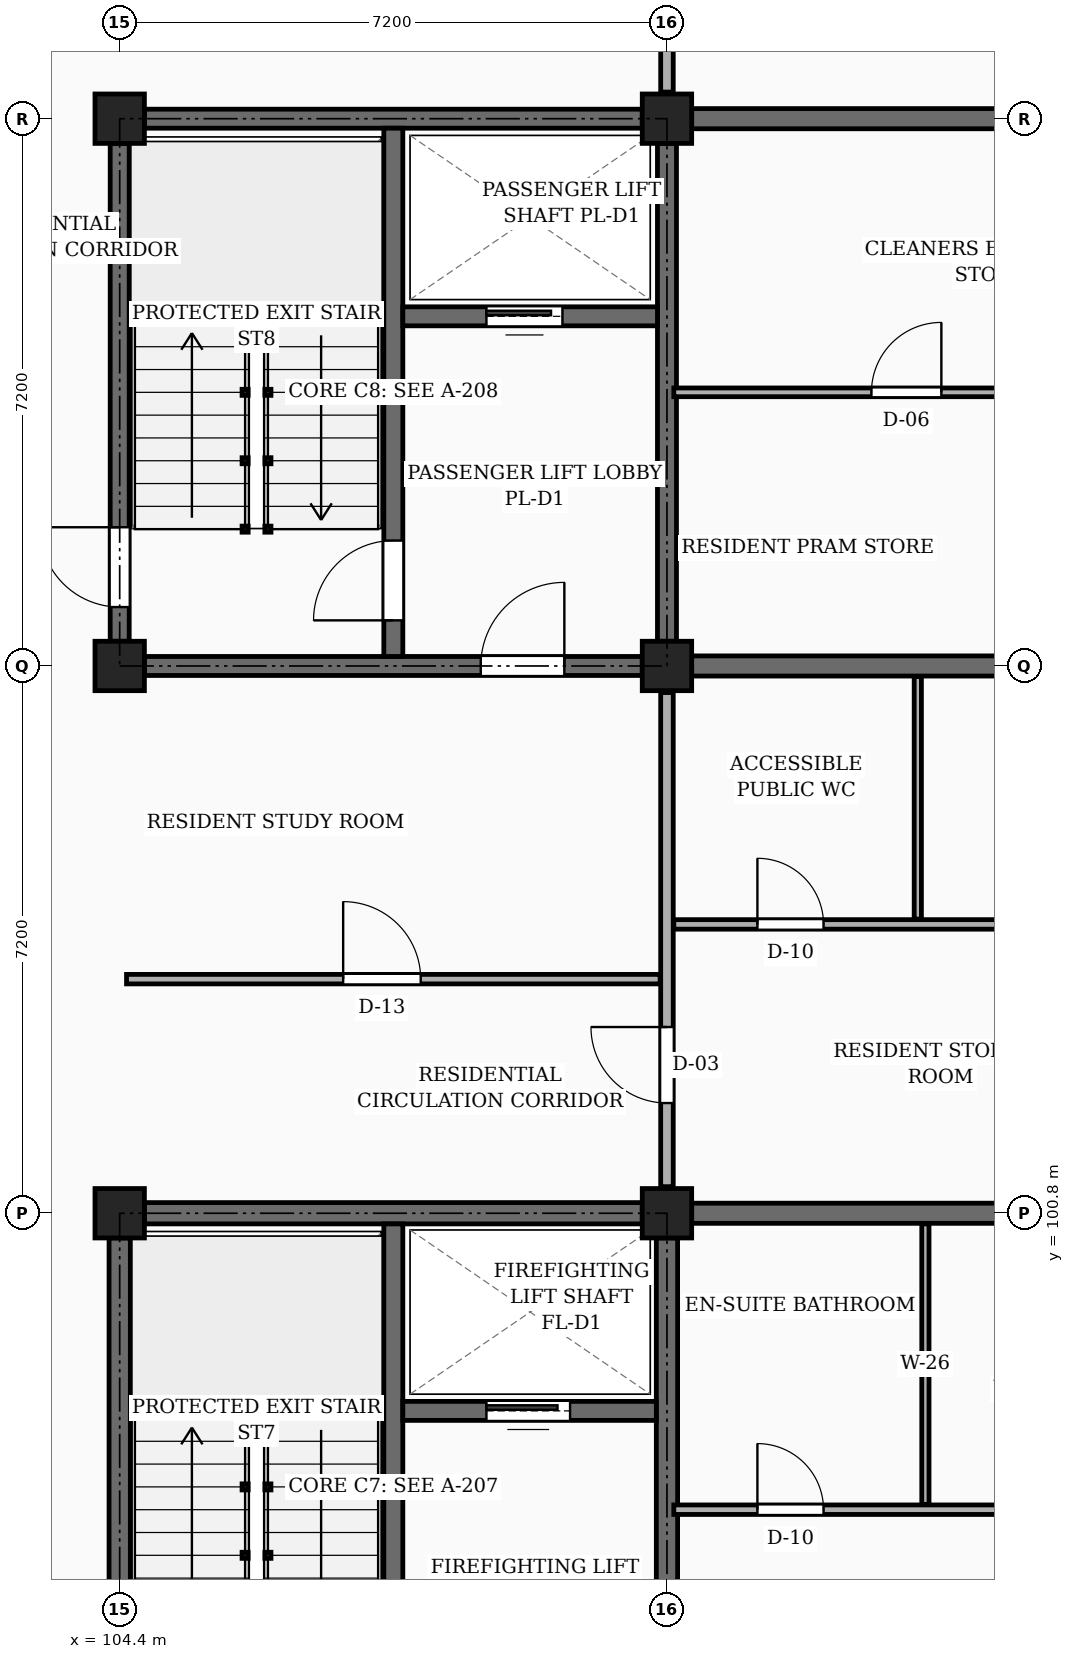
"""IFC4 building model, lengths in metres.
Left out: names, types, materials, properties, quantities, classifications, styles, units other than length and angle.
Written with IfcOpenShell. Run it as: python <this file> out.ifc"""

import sys

from ifc_helpers import new_model, si_unit, direction, frame, frame_2d, origin, origin_2d, place, context, subcontext, project, spatial, rectangle, extrude, element, fill, save


model = new_model("IFC4")
c1 = context("Model", 3, precision=1e-05, world=origin(), true_north=direction((0.0, 1.0)))
c2 = subcontext(c1, "Body", "Model", "MODEL_VIEW")
j1 = project(units=[si_unit("LENGTHUNIT", "METRE"), si_unit("PLANEANGLEUNIT", "RADIAN")], contexts=[c1])
p1 = place(None, origin())
s1 = spatial("IfcSite", under=j1, at=p1, CompositionType="ELEMENT")
p2 = place(p1, origin())
s2 = spatial("IfcBuilding", under=s1, at=p2, CompositionType="ELEMENT")
p3 = place(p2, frame((0.0, 0.0, 7.65)))
s3 = spatial("IfcBuildingStorey", under=s2, at=p3, CompositionType="ELEMENT", Elevation=7.65)
for number, where, z_axis, x_axis in (
    (1, (104.4, 100.8, 0.0), (0.0, 0.0, 1.0), (1.0, 0.0, 0.0)),
    (2, (104.4, 108.0, 0.0), (0.0, 0.0, 1.0), (1.0, 0.0, 0.0)),
    (3, (104.4, 115.2, 0.0), (0.0, 0.0, 1.0), (1.0, 0.0, 0.0)),
    (4, (111.6, 100.8, 0.0), (0.0, 0.0, 1.0), (1.0, 0.0, 0.0)),
    (5, (111.6, 108.0, 0.0), (0.0, 0.0, 1.0), (1.0, 0.0, 0.0)),
    (6, (111.6, 115.2, 0.0), (0.0, 0.0, 1.0), (1.0, 0.0, 0.0)),
):
    element("IfcColumn", number, at=place(p3, frame(where, z_axis=z_axis, x_axis=x_axis)), inside=s3, PredefinedType="COLUMN", context=c2, shape_type="SweptSolid", body=[
        extrude(rectangle(XDim=0.65, YDim=0.65, at=origin_2d()), origin(), (0.0, 0.0, 1.0), 3.15),
    ])
p4 = place(p3, frame((111.925, 100.8, 0.0), z_axis=(0.0, 0.0, 1.0), x_axis=(1.0, 0.0, 0.0)))
e7 = element("IfcWall", 7, at=p4, inside=s3, PredefinedType="SOLIDWALL", context=c2, shape_type="SweptSolid", body=[
    extrude(rectangle(XDim=6.575, YDim=0.265, at=frame_2d((3.288, 0.0))), origin(), (0.0, 0.0, 1.0), 2.19),
])
p5 = place(p3, frame((111.925, 108.0, 0.0), z_axis=(0.0, 0.0, 1.0), x_axis=(1.0, 0.0, 0.0)))
e8 = element("IfcWall", 8, at=p5, inside=s3, PredefinedType="SOLIDWALL", context=c2, shape_type="SweptSolid", body=[
    extrude(rectangle(XDim=6.575, YDim=0.265, at=frame_2d((3.288, 0.0))), origin(), (0.0, 0.0, 1.0), 2.19),
])
p6 = place(p5, frame((4.35, 0.0, 0.0)))
e9 = element("IfcOpeningElement", 9, at=p6, cuts=e8, PredefinedType="OPENING", context=c2, shape_type="SweptSolid", body=[
    extrude(rectangle(XDim=0.98, YDim=2.12, at=frame_2d((0.49, 1.06))), frame((0.0, 0.143, 0.0), z_axis=(0.0, -1.0, 0.0), x_axis=(1.0, 0.0, 0.0)), (0.0, 0.0, 1.0), 0.285),
])
p7 = place(p3, frame((111.925, 115.2, 0.0), z_axis=(0.0, 0.0, 1.0), x_axis=(1.0, 0.0, 0.0)))
e10 = element("IfcWall", 10, at=p7, inside=s3, PredefinedType="SOLIDWALL", context=c2, shape_type="SweptSolid", body=[
    extrude(rectangle(XDim=6.575, YDim=0.265, at=frame_2d((3.288, 0.0))), origin(), (0.0, 0.0, 1.0), 2.19),
])
p8 = place(p3, frame((104.4, 93.925, 0.0), z_axis=(0.0, 0.0, 1.0), x_axis=(0.0, 1.0, 0.0)))
e11 = element("IfcWall", 11, at=p8, inside=s3, PredefinedType="SHEAR", context=c2, shape_type="SweptSolid", body=[
    extrude(rectangle(XDim=6.55, YDim=0.28, at=frame_2d((3.275, 0.0))), origin(), (0.0, 0.0, 1.0), 2.89),
])
p9 = place(p8, frame((0.45, 0.0, 0.0)))
e12 = element("IfcOpeningElement", 12, at=p9, cuts=e11, PredefinedType="OPENING", context=c2, shape_type="SweptSolid", body=[
    extrude(rectangle(XDim=1.05, YDim=2.15, at=frame_2d((0.525, 1.075))), frame((0.0, 0.15, 0.0), z_axis=(0.0, -1.0, 0.0), x_axis=(1.0, 0.0, 0.0)), (0.0, 0.0, 1.0), 0.3),
])
p10 = place(p3, frame((104.725, 100.8, 0.0), z_axis=(0.0, 0.0, 1.0), x_axis=(1.0, 0.0, 0.0)))
e13 = element("IfcWall", 13, at=p10, inside=s3, PredefinedType="SHEAR", context=c2, shape_type="SweptSolid", body=[
    extrude(rectangle(XDim=6.55, YDim=0.28, at=frame_2d((3.275, 0.0))), origin(), (0.0, 0.0, 1.0), 2.89),
])
p11 = place(p3, frame((111.6, 93.925, 0.0), z_axis=(0.0, 0.0, 1.0), x_axis=(0.0, 1.0, 0.0)))
e14 = element("IfcWall", 14, at=p11, inside=s3, PredefinedType="SHEAR", context=c2, shape_type="SweptSolid", body=[
    extrude(rectangle(XDim=6.55, YDim=0.28, at=frame_2d((3.275, 0.0))), origin(), (0.0, 0.0, 1.0), 2.89),
])
p12 = place(p3, frame((108.0, 93.74, 0.0), z_axis=(0.0, 0.0, 1.0), x_axis=(0.0, 1.0, 0.0)))
e15 = element("IfcWall", 15, at=p12, inside=s3, PredefinedType="SHEAR", context=c2, shape_type="SweptSolid", body=[
    extrude(rectangle(XDim=6.92, YDim=0.25, at=frame_2d((3.46, 0.0))), origin(), (0.0, 0.0, 1.0), 2.89),
])
p13 = place(p12, frame((0.46, 0.0, 0.0)))
e16 = element("IfcOpeningElement", 16, at=p13, cuts=e15, PredefinedType="OPENING", context=c2, shape_type="SweptSolid", body=[
    extrude(rectangle(XDim=1.05, YDim=2.15, at=frame_2d((0.525, 1.075))), frame((0.0, 0.135, 0.0), z_axis=(0.0, -1.0, 0.0), x_axis=(1.0, 0.0, 0.0)), (0.0, 0.0, 1.0), 0.27),
])
p14 = place(p3, frame((108.125, 98.2, 0.0), z_axis=(0.0, 0.0, 1.0), x_axis=(1.0, 0.0, 0.0)))
e17 = element("IfcWall", 17, at=p14, inside=s3, PredefinedType="SHEAR", context=c2, shape_type="SweptSolid", body=[
    extrude(rectangle(XDim=3.335, YDim=0.25, at=frame_2d((1.667, 0.0))), origin(), (0.0, 0.0, 1.0), 2.89),
])
p15 = place(p14, frame((1.1, 0.0, 0.0)))
e18 = element("IfcOpeningElement", 18, at=p15, cuts=e17, PredefinedType="OPENING", context=c2, shape_type="SweptSolid", body=[
    extrude(rectangle(XDim=1.1, YDim=2.2, at=frame_2d((0.55, 1.1))), frame((0.0, 0.135, 0.0), z_axis=(0.0, -1.0, 0.0), x_axis=(1.0, 0.0, 0.0)), (0.0, 0.0, 1.0), 0.27),
])
p16 = place(p3, frame((104.4, 108.325, 0.0), z_axis=(0.0, 0.0, 1.0), x_axis=(0.0, 1.0, 0.0)))
e19 = element("IfcWall", 19, at=p16, inside=s3, PredefinedType="SHEAR", context=c2, shape_type="SweptSolid", body=[
    extrude(rectangle(XDim=6.55, YDim=0.25, at=frame_2d((3.275, 0.0))), origin(), (0.0, 0.0, 1.0), 2.89),
])
p17 = place(p16, frame((0.45, 0.0, 0.0)))
e20 = element("IfcOpeningElement", 20, at=p17, cuts=e19, PredefinedType="OPENING", context=c2, shape_type="SweptSolid", body=[
    extrude(rectangle(XDim=1.05, YDim=2.15, at=frame_2d((0.525, 1.075))), frame((0.0, 0.135, 0.0), z_axis=(0.0, -1.0, 0.0), x_axis=(1.0, 0.0, 0.0)), (0.0, 0.0, 1.0), 0.27),
])
p18 = place(p3, frame((104.725, 115.2, 0.0), z_axis=(0.0, 0.0, 1.0), x_axis=(1.0, 0.0, 0.0)))
e21 = element("IfcWall", 21, at=p18, inside=s3, PredefinedType="SHEAR", context=c2, shape_type="SweptSolid", body=[
    extrude(rectangle(XDim=6.55, YDim=0.25, at=frame_2d((3.275, 0.0))), origin(), (0.0, 0.0, 1.0), 2.89),
])
p19 = place(p3, frame((111.6, 108.325, 0.0), z_axis=(0.0, 0.0, 1.0), x_axis=(0.0, 1.0, 0.0)))
e22 = element("IfcWall", 22, at=p19, inside=s3, PredefinedType="SHEAR", context=c2, shape_type="SweptSolid", body=[
    extrude(rectangle(XDim=6.55, YDim=0.25, at=frame_2d((3.275, 0.0))), origin(), (0.0, 0.0, 1.0), 2.89),
])
p20 = place(p3, frame((104.725, 108.0, 0.0), z_axis=(0.0, 0.0, 1.0), x_axis=(1.0, 0.0, 0.0)))
e23 = element("IfcWall", 23, at=p20, inside=s3, PredefinedType="SHEAR", context=c2, shape_type="SweptSolid", body=[
    extrude(rectangle(XDim=6.55, YDim=0.25, at=frame_2d((3.275, 0.0))), origin(), (0.0, 0.0, 1.0), 2.89),
])
p21 = place(p20, frame((4.425, 0.0, 0.0)))
e24 = element("IfcOpeningElement", 24, at=p21, cuts=e23, PredefinedType="OPENING", context=c2, shape_type="SweptSolid", body=[
    extrude(rectangle(XDim=1.1, YDim=2.15, at=frame_2d((0.55, 1.075))), frame((0.0, 0.135, 0.0), z_axis=(0.0, -1.0, 0.0), x_axis=(1.0, 0.0, 0.0)), (0.0, 0.0, 1.0), 0.27),
])
p22 = place(p3, frame((108.0, 108.125, 0.0), z_axis=(0.0, 0.0, 1.0), x_axis=(0.0, 1.0, 0.0)))
e25 = element("IfcWall", 25, at=p22, inside=s3, PredefinedType="SHEAR", context=c2, shape_type="SweptSolid", body=[
    extrude(rectangle(XDim=6.95, YDim=0.25, at=frame_2d((3.475, 0.0))), origin(), (0.0, 0.0, 1.0), 2.89),
])
p23 = place(p22, frame((0.475, 0.0, 0.0)))
e26 = element("IfcOpeningElement", 26, at=p23, cuts=e25, PredefinedType="OPENING", context=c2, shape_type="SweptSolid", body=[
    extrude(rectangle(XDim=1.05, YDim=2.15, at=frame_2d((0.525, 1.075))), frame((0.0, 0.135, 0.0), z_axis=(0.0, -1.0, 0.0), x_axis=(1.0, 0.0, 0.0)), (0.0, 0.0, 1.0), 0.27),
])
p24 = place(p3, frame((108.125, 112.6, 0.0), z_axis=(0.0, 0.0, 1.0), x_axis=(1.0, 0.0, 0.0)))
e27 = element("IfcWall", 27, at=p24, inside=s3, PredefinedType="SHEAR", context=c2, shape_type="SweptSolid", body=[
    extrude(rectangle(XDim=3.35, YDim=0.25, at=frame_2d((1.675, 0.0))), origin(), (0.0, 0.0, 1.0), 2.89),
])
p25 = place(p24, frame((1.1, 0.0, 0.0)))
e28 = element("IfcOpeningElement", 28, at=p25, cuts=e27, PredefinedType="OPENING", context=c2, shape_type="SweptSolid", body=[
    extrude(rectangle(XDim=1.0, YDim=2.2, at=frame_2d((0.5, 1.1))), frame((0.0, 0.135, 0.0), z_axis=(0.0, -1.0, 0.0), x_axis=(1.0, 0.0, 0.0)), (0.0, 0.0, 1.0), 0.27),
])
p26 = place(p3, frame((111.6, 101.15, 0.0), z_axis=(0.0, 0.0, 1.0), x_axis=(0.0, 1.0, 0.0)))
e29 = element("IfcWall", 29, at=p26, inside=s3, PredefinedType="PARTITIONING", context=c2, shape_type="SweptSolid", body=[
    extrude(rectangle(XDim=6.5, YDim=0.165, at=frame_2d((3.25, 0.0))), origin(), (0.0, 0.0, 1.0), 2.24),
])
p27 = place(p26, frame((1.1, 0.0, 0.0)))
e30 = element("IfcOpeningElement", 30, at=p27, cuts=e29, PredefinedType="OPENING", context=c2, shape_type="SweptSolid", body=[
    extrude(rectangle(XDim=1.0, YDim=2.15, at=frame_2d((0.5, 1.075))), frame((0.0, 0.093, 0.0), z_axis=(0.0, -1.0, 0.0), x_axis=(1.0, 0.0, 0.0)), (0.0, 0.0, 1.0), 0.185),
])
p28 = place(p3, frame((111.6, 115.55, 0.0), z_axis=(0.0, 0.0, 1.0), x_axis=(0.0, 1.0, 0.0)))
e31 = element("IfcWall", 31, at=p28, inside=s3, PredefinedType="PARTITIONING", context=c2, shape_type="SweptSolid", body=[
    extrude(rectangle(XDim=6.5, YDim=0.165, at=frame_2d((3.25, 0.0))), origin(), (0.0, 0.0, 1.0), 2.24),
])
p29 = place(p28, frame((1.1, 0.0, 0.0)))
e32 = element("IfcOpeningElement", 32, at=p29, cuts=e31, PredefinedType="OPENING", context=c2, shape_type="SweptSolid", body=[
    extrude(rectangle(XDim=0.94, YDim=2.12, at=frame_2d((0.47, 1.06))), frame((0.0, 0.093, 0.0), z_axis=(0.0, -1.0, 0.0), x_axis=(1.0, 0.0, 0.0)), (0.0, 0.0, 1.0), 0.185),
])
p30 = place(p3, frame((111.69, 96.9, 0.0), z_axis=(0.0, 0.0, 1.0), x_axis=(1.0, 0.0, 0.0)))
e33 = element("IfcWall", 33, at=p30, inside=s3, PredefinedType="PARTITIONING", context=c2, shape_type="SweptSolid", body=[
    extrude(rectangle(XDim=6.935, YDim=0.125, at=frame_2d((3.468, 0.0))), origin(), (0.0, 0.0, 1.0), 2.325),
])
p31 = place(p30, frame((1.1, 0.0, 0.0)))
e34 = element("IfcOpeningElement", 34, at=p31, cuts=e33, PredefinedType="OPENING", context=c2, shape_type="SweptSolid", body=[
    extrude(rectangle(XDim=0.87, YDim=2.05, at=frame_2d((0.435, 1.025))), frame((0.0, 0.073, 0.0), z_axis=(0.0, -1.0, 0.0), x_axis=(1.0, 0.0, 0.0)), (0.0, 0.0, 1.0), 0.145),
])
p32 = place(p30, frame((4.5, 0.0, 0.0)))
e35 = element("IfcOpeningElement", 35, at=p32, cuts=e33, PredefinedType="OPENING", context=c2, shape_type="SweptSolid", body=[
    extrude(rectangle(XDim=0.88, YDim=2.08, at=frame_2d((0.44, 1.04))), frame((0.0, 0.073, 0.0), z_axis=(0.0, -1.0, 0.0), x_axis=(1.0, 0.0, 0.0)), (0.0, 0.0, 1.0), 0.145),
])
p33 = place(p3, frame((115.0, 96.97, 0.0), z_axis=(0.0, 0.0, 1.0), x_axis=(0.0, 1.0, 0.0)))
e36 = element("IfcWall", 36, at=p33, inside=s3, PredefinedType="PARTITIONING", context=c2, shape_type="SweptSolid", body=[
    extrude(rectangle(XDim=3.69, YDim=0.095, at=frame_2d((1.845, 0.0))), origin(), (0.0, 0.0, 1.0), 2.325),
])
p34 = place(p3, frame((104.49, 103.88, 0.0), z_axis=(0.0, 0.0, 1.0), x_axis=(1.0, 0.0, 0.0)))
e37 = element("IfcWall", 37, at=p34, inside=s3, PredefinedType="PARTITIONING", context=c2, shape_type="SweptSolid", body=[
    extrude(rectangle(XDim=7.02, YDim=0.125, at=frame_2d((3.51, 0.0))), origin(), (0.0, 0.0, 1.0), 2.325),
])
p35 = place(p34, frame((2.85, 0.0, 0.0)))
e38 = element("IfcOpeningElement", 38, at=p35, cuts=e37, PredefinedType="OPENING", context=c2, shape_type="SweptSolid", body=[
    extrude(rectangle(XDim=1.02, YDim=2.15, at=frame_2d((0.51, 1.075))), frame((0.0, 0.073, 0.0), z_axis=(0.0, -1.0, 0.0), x_axis=(1.0, 0.0, 0.0)), (0.0, 0.0, 1.0), 0.145),
])
p36 = place(p3, frame((111.69, 104.6, 0.0), z_axis=(0.0, 0.0, 1.0), x_axis=(1.0, 0.0, 0.0)))
e39 = element("IfcWall", 39, at=p36, inside=s3, PredefinedType="PARTITIONING", context=c2, shape_type="SweptSolid", body=[
    extrude(rectangle(XDim=6.935, YDim=0.125, at=frame_2d((3.468, 0.0))), origin(), (0.0, 0.0, 1.0), 2.325),
])
p37 = place(p36, frame((1.1, 0.0, 0.0)))
e40 = element("IfcOpeningElement", 40, at=p37, cuts=e39, PredefinedType="OPENING", context=c2, shape_type="SweptSolid", body=[
    extrude(rectangle(XDim=0.87, YDim=2.05, at=frame_2d((0.435, 1.025))), frame((0.0, 0.073, 0.0), z_axis=(0.0, -1.0, 0.0), x_axis=(1.0, 0.0, 0.0)), (0.0, 0.0, 1.0), 0.145),
])
p38 = place(p36, frame((4.5, 0.0, 0.0)))
e41 = element("IfcOpeningElement", 41, at=p38, cuts=e39, PredefinedType="OPENING", context=c2, shape_type="SweptSolid", body=[
    extrude(rectangle(XDim=0.92, YDim=2.1, at=frame_2d((0.46, 1.05))), frame((0.0, 0.073, 0.0), z_axis=(0.0, -1.0, 0.0), x_axis=(1.0, 0.0, 0.0)), (0.0, 0.0, 1.0), 0.145),
])
p39 = place(p3, frame((114.9, 104.67, 0.0), z_axis=(0.0, 0.0, 1.0), x_axis=(0.0, 1.0, 0.0)))
e42 = element("IfcWall", 42, at=p39, inside=s3, PredefinedType="PARTITIONING", context=c2, shape_type="SweptSolid", body=[
    extrude(rectangle(XDim=3.19, YDim=0.095, at=frame_2d((1.595, 0.0))), origin(), (0.0, 0.0, 1.0), 2.325),
])
p40 = place(p3, frame((111.69, 111.6, 0.0), z_axis=(0.0, 0.0, 1.0), x_axis=(1.0, 0.0, 0.0)))
e43 = element("IfcWall", 43, at=p40, inside=s3, PredefinedType="PARTITIONING", context=c2, shape_type="SweptSolid", body=[
    extrude(rectangle(XDim=6.935, YDim=0.115, at=frame_2d((3.468, 0.0))), origin(), (0.0, 0.0, 1.0), 2.325),
])
p41 = place(p40, frame((2.6, 0.0, 0.0)))
e44 = element("IfcOpeningElement", 44, at=p41, cuts=e43, PredefinedType="OPENING", context=c2, shape_type="SweptSolid", body=[
    extrude(rectangle(XDim=0.92, YDim=2.1, at=frame_2d((0.46, 1.05))), frame((0.0, 0.067, 0.0), z_axis=(0.0, -1.0, 0.0), x_axis=(1.0, 0.0, 0.0)), (0.0, 0.0, 1.0), 0.135),
])
p42 = place(p15, origin())
e45 = element("IfcDoor", 45, at=p42, inside=s3, OperationType="SLIDING_TO_LEFT", PredefinedType="DOOR", context=c2, shape_type="SweptSolid", body=[
    extrude(rectangle(XDim=1.1, YDim=2.2, at=frame_2d((0.55, 1.1))), frame((0.0, 0.025, 0.0), z_axis=(0.0, -1.0, 0.0), x_axis=(1.0, 0.0, 0.0)), (0.0, 0.0, 1.0), 0.05),
])
fill(e18, e45)
p43 = place(p17, origin())
e46 = element("IfcDoor", 46, at=p43, inside=s3, OperationType="SINGLE_SWING_RIGHT", PredefinedType="DOOR", context=c2, shape_type="SweptSolid", body=[
    extrude(rectangle(XDim=1.05, YDim=2.15, at=frame_2d((0.525, 1.075))), frame((0.0, 0.025, 0.0), z_axis=(0.0, -1.0, 0.0), x_axis=(1.0, 0.0, 0.0)), (0.0, 0.0, 1.0), 0.05),
])
fill(e20, e46)
p44 = place(p21, frame((1.1, 0.0, 0.0), z_axis=(0.0, 0.0, 1.0), x_axis=(-1.0, 0.0, 0.0)))
e47 = element("IfcDoor", 47, at=p44, inside=s3, OperationType="SINGLE_SWING_RIGHT", PredefinedType="DOOR", context=c2, shape_type="SweptSolid", body=[
    extrude(rectangle(XDim=1.1, YDim=2.15, at=frame_2d((0.55, 1.075))), frame((0.0, 0.025, 0.0), z_axis=(0.0, -1.0, 0.0), x_axis=(1.0, 0.0, 0.0)), (0.0, 0.0, 1.0), 0.05),
])
fill(e24, e47)
p45 = place(p23, origin())
e48 = element("IfcDoor", 48, at=p45, inside=s3, OperationType="SINGLE_SWING_LEFT", PredefinedType="DOOR", context=c2, shape_type="SweptSolid", body=[
    extrude(rectangle(XDim=1.05, YDim=2.15, at=frame_2d((0.525, 1.075))), frame((0.0, 0.025, 0.0), z_axis=(0.0, -1.0, 0.0), x_axis=(1.0, 0.0, 0.0)), (0.0, 0.0, 1.0), 0.05),
])
fill(e26, e48)
p46 = place(p25, origin())
e49 = element("IfcDoor", 49, at=p46, inside=s3, OperationType="SLIDING_TO_LEFT", PredefinedType="DOOR", context=c2, shape_type="SweptSolid", body=[
    extrude(rectangle(XDim=1.0, YDim=2.2, at=frame_2d((0.5, 1.1))), frame((0.0, 0.025, 0.0), z_axis=(0.0, -1.0, 0.0), x_axis=(1.0, 0.0, 0.0)), (0.0, 0.0, 1.0), 0.05),
])
fill(e28, e49)
p47 = place(p27, origin())
e50 = element("IfcDoor", 50, at=p47, inside=s3, OperationType="SINGLE_SWING_RIGHT", PredefinedType="DOOR", context=c2, shape_type="SweptSolid", body=[
    extrude(rectangle(XDim=1.0, YDim=2.15, at=frame_2d((0.5, 1.075))), frame((0.0, 0.025, 0.0), z_axis=(0.0, -1.0, 0.0), x_axis=(1.0, 0.0, 0.0)), (0.0, 0.0, 1.0), 0.05),
])
fill(e30, e50)
p48 = place(p31, origin())
e51 = element("IfcDoor", 51, at=p48, inside=s3, OperationType="SINGLE_SWING_LEFT", PredefinedType="DOOR", context=c2, shape_type="SweptSolid", body=[
    extrude(rectangle(XDim=0.87, YDim=2.05, at=frame_2d((0.435, 1.025))), frame((0.0, 0.025, 0.0), z_axis=(0.0, -1.0, 0.0), x_axis=(1.0, 0.0, 0.0)), (0.0, 0.0, 1.0), 0.05),
])
fill(e34, e51)
p49 = place(p35, origin())
e52 = element("IfcDoor", 52, at=p49, inside=s3, OperationType="SINGLE_SWING_LEFT", PredefinedType="DOOR", context=c2, shape_type="SweptSolid", body=[
    extrude(rectangle(XDim=1.02, YDim=2.15, at=frame_2d((0.51, 1.075))), frame((0.0, 0.025, 0.0), z_axis=(0.0, -1.0, 0.0), x_axis=(1.0, 0.0, 0.0)), (0.0, 0.0, 1.0), 0.05),
])
fill(e38, e52)
p50 = place(p37, origin())
e53 = element("IfcDoor", 53, at=p50, inside=s3, OperationType="SINGLE_SWING_LEFT", PredefinedType="DOOR", context=c2, shape_type="SweptSolid", body=[
    extrude(rectangle(XDim=0.87, YDim=2.05, at=frame_2d((0.435, 1.025))), frame((0.0, 0.025, 0.0), z_axis=(0.0, -1.0, 0.0), x_axis=(1.0, 0.0, 0.0)), (0.0, 0.0, 1.0), 0.05),
])
fill(e40, e53)
p51 = place(p41, origin())
e54 = element("IfcDoor", 54, at=p51, inside=s3, OperationType="SINGLE_SWING_RIGHT", PredefinedType="DOOR", context=c2, shape_type="SweptSolid", body=[
    extrude(rectangle(XDim=0.92, YDim=2.1, at=frame_2d((0.46, 1.05))), frame((0.0, 0.025, 0.0), z_axis=(0.0, -1.0, 0.0), x_axis=(1.0, 0.0, 0.0)), (0.0, 0.0, 1.0), 0.05),
])
fill(e44, e54)
save(model, sys.argv[1])
